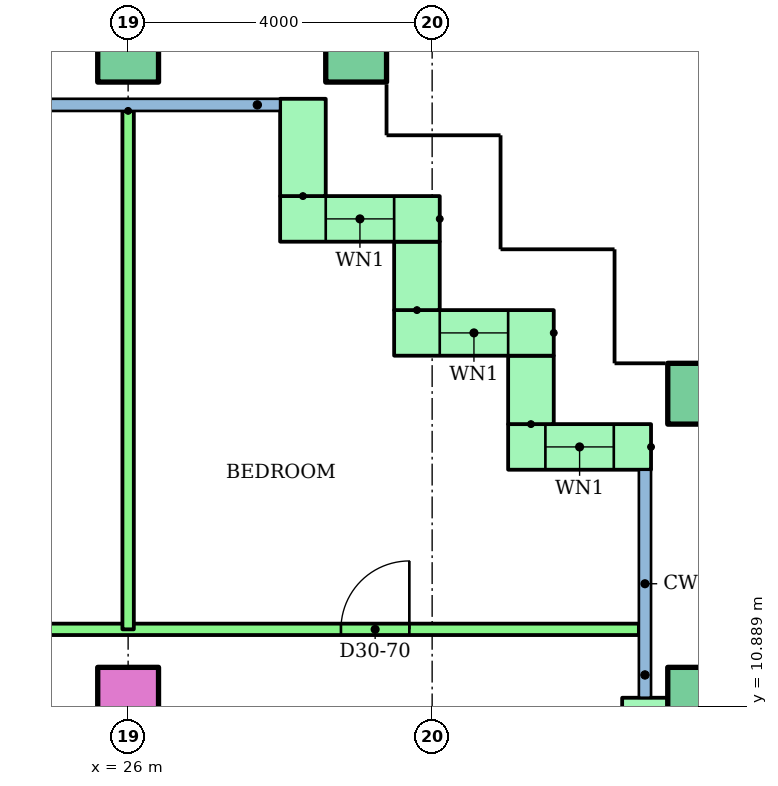
"""IFC4 building model, lengths in metres.
Left out: names, types, materials, properties, quantities, classifications, styles, units other than length and angle.
Written with IfcOpenShell. Run it as: python <this file> out.ifc"""

import sys

from ifc_helpers import new_model, si_unit, direction, frame, frame_2d, origin, origin_2d, place, context, subcontext, project, spatial, rectangle, hollow_rectangle, extrude, element, fill, save


model = new_model("IFC4")
c1 = context("Model", 3, precision=1e-05, world=origin(), true_north=direction((0.0, 1.0)))
c2 = subcontext(c1, "Body", "Model", "MODEL_VIEW")
j1 = project(units=[si_unit("LENGTHUNIT", "METRE"), si_unit("PLANEANGLEUNIT", "RADIAN")], contexts=[c1])
p1 = place(None, origin())
s1 = spatial("IfcSite", under=j1, at=p1, CompositionType="ELEMENT")
p2 = place(p1, origin())
s2 = spatial("IfcBuilding", under=s1, at=p2, CompositionType="ELEMENT")
p3 = place(p2, frame((0.0, 0.0, 119.8)))
s3 = spatial("IfcBuildingStorey", under=s2, at=p3, CompositionType="ELEMENT", Elevation=119.8)
p4 = place(p3, frame((26.0, 11.0, 0.0)))
e1 = element("IfcColumn", 1, at=p4, inside=s3, PredefinedType="COLUMN", context=c2, shape_type="SweptSolid", body=[
    extrude(rectangle(XDim=0.8, YDim=0.8, at=origin_2d()), origin(), (0.0, 0.0, 1.0), 3.2),
])
for number, where in (
    (2, (33.5, 11.0, 0.0)),
    (3, (33.5, 15.0, 0.0)),
    (4, (26.0, 19.5, 0.0)),
    (5, (29.0, 19.5, 0.0)),
):
    element("IfcColumn", number, at=place(p3, frame(where)), inside=s3, PredefinedType="COLUMN", context=c2, shape_type="SweptSolid", body=[
        extrude(hollow_rectangle(XDim=0.8, YDim=0.8, WallThickness=0.04, at=origin_2d()), origin(), (0.0, 0.0, 1.0), 3.2),
    ])
p5 = place(p3, frame((32.88, 14.3, 0.0), z_axis=(0.0, 0.0, 1.0), x_axis=(-1.0, 0.0, 0.0)))
e6 = element("IfcWall", 6, at=p5, inside=s3, PredefinedType="STANDARD", context=c2, shape_type="SweptSolid", body=[
    extrude(rectangle(XDim=1.88, YDim=0.6, at=frame_2d((0.94, 0.0))), origin(), (0.0, 0.0, 1.0), 2.92),
])
p6 = place(p5, frame((0.49, 0.0, 0.9)))
e7 = element("IfcOpeningElement", 7, at=p6, cuts=e6, PredefinedType="OPENING", context=c2, shape_type="SweptSolid", body=[
    extrude(rectangle(XDim=0.9, YDim=1.5, at=frame_2d((0.45, 0.75))), frame((0.0, 0.31, 0.0), z_axis=(0.0, -1.0, 0.0), x_axis=(1.0, 0.0, 0.0)), (0.0, 0.0, 1.0), 0.62),
])
p7 = place(p3, frame((31.3, 14.6, 0.0), z_axis=(0.0, 0.0, 1.0), x_axis=(0.0, 1.0, 0.0)))
e8 = element("IfcWall", 8, at=p7, inside=s3, PredefinedType="STANDARD", context=c2, shape_type="SweptSolid", body=[
    extrude(rectangle(XDim=0.9, YDim=0.6, at=frame_2d((0.45, 0.0))), origin(), (0.0, 0.0, 1.0), 2.92),
])
p8 = place(p3, frame((31.6, 15.8, 0.0), z_axis=(0.0, 0.0, 1.0), x_axis=(-1.0, 0.0, 0.0)))
e9 = element("IfcWall", 9, at=p8, inside=s3, PredefinedType="STANDARD", context=c2, shape_type="SweptSolid", body=[
    extrude(rectangle(XDim=2.1, YDim=0.6, at=frame_2d((1.05, 0.0))), origin(), (0.0, 0.0, 1.0), 2.92),
])
p9 = place(p8, frame((0.6, 0.0, 0.9)))
e10 = element("IfcOpeningElement", 10, at=p9, cuts=e9, PredefinedType="OPENING", context=c2, shape_type="SweptSolid", body=[
    extrude(rectangle(XDim=0.9, YDim=1.5, at=frame_2d((0.45, 0.75))), frame((0.0, 0.31, 0.0), z_axis=(0.0, -1.0, 0.0), x_axis=(1.0, 0.0, 0.0)), (0.0, 0.0, 1.0), 0.62),
])
p10 = place(p3, frame((29.8, 16.1, 0.0), z_axis=(0.0, 0.0, 1.0), x_axis=(0.0, 1.0, 0.0)))
e11 = element("IfcWall", 11, at=p10, inside=s3, PredefinedType="STANDARD", context=c2, shape_type="SweptSolid", body=[
    extrude(rectangle(XDim=0.9, YDim=0.6, at=frame_2d((0.45, 0.0))), origin(), (0.0, 0.0, 1.0), 2.92),
])
p11 = place(p3, frame((30.1, 17.3, 0.0), z_axis=(0.0, 0.0, 1.0), x_axis=(-1.0, 0.0, 0.0)))
e12 = element("IfcWall", 12, at=p11, inside=s3, PredefinedType="STANDARD", context=c2, shape_type="SweptSolid", body=[
    extrude(rectangle(XDim=2.1, YDim=0.6, at=frame_2d((1.05, 0.0))), origin(), (0.0, 0.0, 1.0), 2.92),
])
p12 = place(p11, frame((0.6, 0.0, 0.9)))
e13 = element("IfcOpeningElement", 13, at=p12, cuts=e12, PredefinedType="OPENING", context=c2, shape_type="SweptSolid", body=[
    extrude(rectangle(XDim=0.9, YDim=1.5, at=frame_2d((0.45, 0.75))), frame((0.0, 0.31, 0.0), z_axis=(0.0, -1.0, 0.0), x_axis=(1.0, 0.0, 0.0)), (0.0, 0.0, 1.0), 0.62),
])
p13 = place(p3, frame((28.3, 17.6, 0.0), z_axis=(0.0, 0.0, 1.0), x_axis=(0.0, 1.0, 0.0)))
e14 = element("IfcWall", 14, at=p13, inside=s3, PredefinedType="STANDARD", context=c2, shape_type="SweptSolid", body=[
    extrude(rectangle(XDim=1.28, YDim=0.6, at=frame_2d((0.64, 0.0))), origin(), (0.0, 0.0, 1.0), 2.92),
])
p14 = place(p3, frame((32.8, 6.5, 0.0), z_axis=(0.0, 0.0, 1.0), x_axis=(0.0, 1.0, 0.0)))
e15 = element("IfcWall", 15, at=p14, inside=s3, PredefinedType="STANDARD", context=c2, shape_type="SweptSolid", body=[
    extrude(rectangle(XDim=4.5, YDim=0.6, at=frame_2d((2.25, 0.0))), origin(), (0.0, 0.0, 1.0), 2.92),
])
p15 = place(p14, frame((1.65, 0.0, 0.0)))
e16 = element("IfcOpeningElement", 16, at=p15, cuts=e15, PredefinedType="OPENING", context=c2, shape_type="SweptSolid", body=[
    extrude(rectangle(XDim=1.2, YDim=2.1, at=frame_2d((0.6, 1.05))), frame((0.0, 0.31, 0.0), z_axis=(0.0, -1.0, 0.0), x_axis=(1.0, 0.0, 0.0)), (0.0, 0.0, 1.0), 0.62),
])
p16 = place(p3, frame((14.0, 11.9, 0.0)))
e17 = element("IfcWall", 17, at=p16, inside=s3, PredefinedType="PARTITIONING", context=c2, shape_type="SweptSolid", body=[
    extrude(rectangle(XDim=18.72, YDim=0.15, at=frame_2d((9.36, 0.0))), origin(), (0.0, 0.0, 1.0), 2.4),
])
p17 = place(p16, frame((5.5, 0.0, 0.0)))
e18 = element("IfcOpeningElement", 18, at=p17, cuts=e17, PredefinedType="OPENING", context=c2, shape_type="SweptSolid", body=[
    extrude(rectangle(XDim=1.0, YDim=2.1, at=frame_2d((0.5, 1.05))), frame((0.0, 0.085, 0.0), z_axis=(0.0, -1.0, 0.0), x_axis=(1.0, 0.0, 0.0)), (0.0, 0.0, 1.0), 0.17),
])
p18 = place(p16, frame((14.8, 0.0, 0.0)))
e19 = element("IfcOpeningElement", 19, at=p18, cuts=e17, PredefinedType="OPENING", context=c2, shape_type="SweptSolid", body=[
    extrude(rectangle(XDim=0.9, YDim=2.1, at=frame_2d((0.45, 1.05))), frame((0.0, 0.085, 0.0), z_axis=(0.0, -1.0, 0.0), x_axis=(1.0, 0.0, 0.0)), (0.0, 0.0, 1.0), 0.17),
])
p19 = place(p3, frame((26.0, 18.721, 0.0), z_axis=(0.0, 0.0, 1.0), x_axis=(0.0, -1.0, 0.0)))
e20 = element("IfcWall", 20, at=p19, inside=s3, PredefinedType="PARTITIONING", context=c2, shape_type="SweptSolid", body=[
    extrude(rectangle(XDim=6.821, YDim=0.15, at=frame_2d((3.411, 0.0))), origin(), (0.0, 0.0, 1.0), 2.4),
])
p20 = place(p6, origin())
e21 = element("IfcWindow", 21, at=p20, inside=s3, PartitioningType="SINGLE_PANEL", PredefinedType="WINDOW", context=c2, shape_type="SweptSolid", body=[
    extrude(rectangle(XDim=0.9, YDim=1.5, at=frame_2d((0.45, 0.75))), frame((0.0, 0.03, 0.0), z_axis=(0.0, -1.0, 0.0), x_axis=(1.0, 0.0, 0.0)), (0.0, 0.0, 1.0), 0.06),
])
fill(e7, e21)
p21 = place(p9, origin())
e22 = element("IfcWindow", 22, at=p21, inside=s3, PartitioningType="SINGLE_PANEL", PredefinedType="WINDOW", context=c2, shape_type="SweptSolid", body=[
    extrude(rectangle(XDim=0.9, YDim=1.5, at=frame_2d((0.45, 0.75))), frame((0.0, 0.03, 0.0), z_axis=(0.0, -1.0, 0.0), x_axis=(1.0, 0.0, 0.0)), (0.0, 0.0, 1.0), 0.06),
])
fill(e10, e22)
p22 = place(p12, origin())
e23 = element("IfcWindow", 23, at=p22, inside=s3, PartitioningType="SINGLE_PANEL", PredefinedType="WINDOW", context=c2, shape_type="SweptSolid", body=[
    extrude(rectangle(XDim=0.9, YDim=1.5, at=frame_2d((0.45, 0.75))), frame((0.0, 0.03, 0.0), z_axis=(0.0, -1.0, 0.0), x_axis=(1.0, 0.0, 0.0)), (0.0, 0.0, 1.0), 0.06),
])
fill(e13, e23)
p23 = place(p18, origin())
e24 = element("IfcDoor", 24, at=p23, inside=s3, OperationType="SINGLE_SWING_RIGHT", PredefinedType="DOOR", context=c2, shape_type="SweptSolid", body=[
    extrude(rectangle(XDim=0.9, YDim=2.1, at=frame_2d((0.45, 1.05))), frame((0.0, 0.025, 0.0), z_axis=(0.0, -1.0, 0.0), x_axis=(1.0, 0.0, 0.0)), (0.0, 0.0, 1.0), 0.05),
])
fill(e19, e24)
save(model, sys.argv[1])
